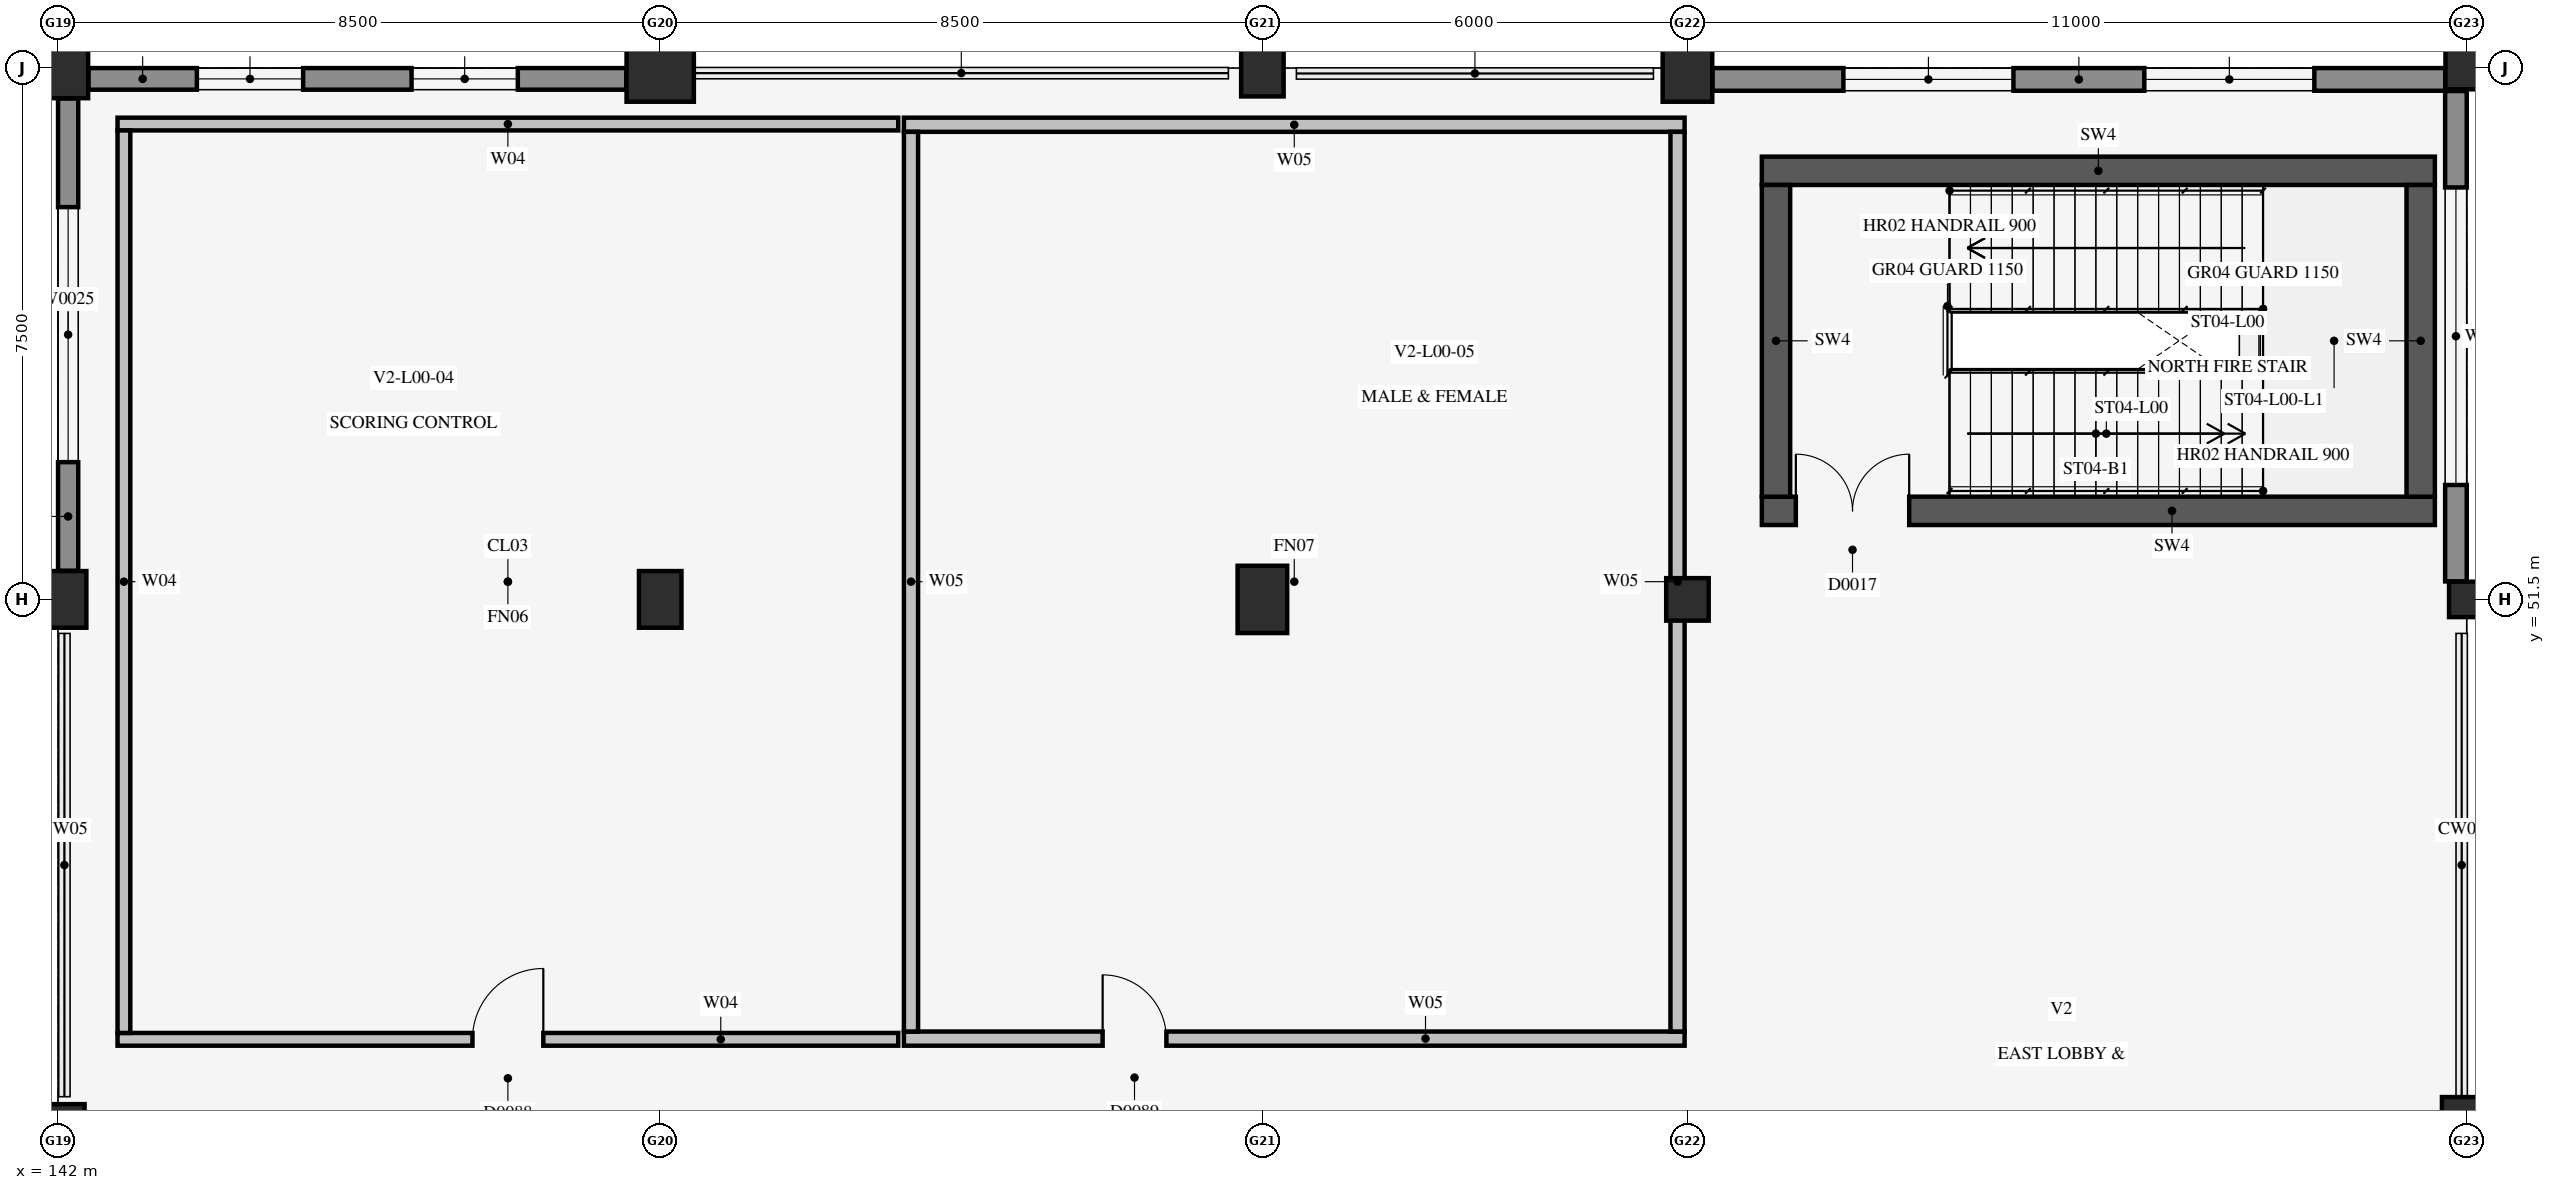
"""IFC4 building model, lengths in metres.
Left out: names, types, materials, properties, quantities, classifications, styles, units other than length and angle.
Written with IfcOpenShell. Run it as: python <this file> out.ifc"""

import sys

from ifc_helpers import new_model, si_unit, direction, frame, frame_2d, origin, origin_2d, place, context, subcontext, project, spatial, rectangle, circle, extrude, element, fill, save


model = new_model("IFC4")
c1 = context("Model", 3, precision=1e-05, world=origin(), true_north=direction((0.0, 1.0)))
c2 = subcontext(c1, "Body", "Model", "MODEL_VIEW")
j1 = project(units=[si_unit("LENGTHUNIT", "METRE"), si_unit("PLANEANGLEUNIT", "RADIAN")], contexts=[c1])
p1 = place(None, origin())
s1 = spatial("IfcSite", under=j1, at=p1, CompositionType="ELEMENT")
p2 = place(p1, origin())
s2 = spatial("IfcBuilding", under=s1, at=p2, CompositionType="ELEMENT")
p3 = place(p2, origin())
s3 = spatial("IfcBuildingStorey", under=s2, at=p3, CompositionType="ELEMENT", Elevation=0.0)
p4 = place(p3, frame((166.05, 52.75, 0.0), z_axis=(0.0, 0.0, 1.0), x_axis=(1.0, 0.0, 0.0)))
e1 = element("IfcWall", 1, at=p4, inside=s3, PredefinedType="SHEAR", context=c2, shape_type="SweptSolid", body=[
    extrude(rectangle(XDim=9.5, YDim=0.4, at=frame_2d((4.75, 0.0))), origin(), (0.0, 0.0, 1.0), 5.14),
])
p5 = place(p4, frame((0.48, 0.0, 0.0)))
e2 = element("IfcOpeningElement", 2, at=p5, cuts=e1, PredefinedType="OPENING", context=c2, shape_type="SweptSolid", body=[
    extrude(rectangle(XDim=1.6, YDim=2.2, at=frame_2d((0.8, 1.1))), frame((0.0, 0.212, 0.0), z_axis=(0.0, -1.0, 0.0), x_axis=(1.0, 0.0, 0.0)), (0.0, 0.0, 1.0), 0.424),
])
p6 = place(p3, frame((166.05, 57.55, 0.0), z_axis=(0.0, 0.0, 1.0), x_axis=(1.0, 0.0, 0.0)))
e3 = element("IfcWall", 3, at=p6, inside=s3, PredefinedType="SHEAR", context=c2, shape_type="SweptSolid", body=[
    extrude(rectangle(XDim=9.5, YDim=0.4, at=frame_2d((4.75, 0.0))), origin(), (0.0, 0.0, 1.0), 5.14),
])
for number, where, z_axis, x_axis in (
    (4, (166.25, 52.95, 0.0), (0.0, 0.0, 1.0), (0.0, 1.0, 0.0)),
    (5, (175.35, 52.95, 0.0), (0.0, 0.0, 1.0), (0.0, 1.0, 0.0)),
):
    element("IfcWall", number, at=place(p3, frame(where, z_axis=z_axis, x_axis=x_axis)), inside=s3, PredefinedType="SHEAR", context=c2, shape_type="SweptSolid", body=[
        extrude(rectangle(XDim=4.4, YDim=0.4, at=frame_2d((2.2, 0.0))), origin(), (0.0, 0.0, 1.0), 5.14),
    ])
p7 = place(p3, frame((142.0, 44.0, 0.0), z_axis=(0.0, 0.0, 1.0), x_axis=(1.0, 0.0, 0.0)))
e6 = element("IfcColumn", 6, at=p7, inside=s3, PredefinedType="COLUMN", context=c2, shape_type="SweptSolid", body=[
    extrude(rectangle(XDim=0.75, YDim=0.75, at=origin_2d()), origin(), (0.0, 0.0, 1.0), 5.4),
])
p8 = place(p3, frame((142.0, 51.5, 0.0), z_axis=(0.0, 0.0, 1.0), x_axis=(1.0, 0.0, 0.0)))
e7 = element("IfcColumn", 7, at=p8, inside=s3, PredefinedType="COLUMN", context=c2, shape_type="SweptSolid", body=[
    extrude(rectangle(XDim=0.8, YDim=0.8, at=origin_2d()), origin(), (0.0, 0.0, 1.0), 5.4),
])
p9 = place(p3, frame((142.0, 59.0, 0.0), z_axis=(0.0, 0.0, 1.0), x_axis=(1.0, 0.0, 0.0)))
e8 = element("IfcColumn", 8, at=p9, inside=s3, PredefinedType="COLUMN", context=c2, shape_type="SweptSolid", body=[
    extrude(rectangle(XDim=0.85, YDim=0.85, at=origin_2d()), origin(), (0.0, 0.0, 1.0), 5.4),
])
p10 = place(p3, frame((150.5, 51.5, 0.0), z_axis=(0.0, 0.0, 1.0), x_axis=(1.0, 0.0, 0.0)))
e9 = element("IfcColumn", 9, at=p10, inside=s3, PredefinedType="COLUMN", context=c2, shape_type="SweptSolid", body=[
    extrude(rectangle(XDim=0.6, YDim=0.8, at=origin_2d()), origin(), (0.0, 0.0, 1.0), 5.4),
])
p11 = place(p3, frame((150.5, 59.0, 0.0), z_axis=(0.0, 0.0, 1.0), x_axis=(1.0, 0.0, 0.0)))
e10 = element("IfcColumn", 10, at=p11, inside=s3, PredefinedType="COLUMN", context=c2, shape_type="SweptSolid", body=[
    extrude(rectangle(XDim=0.95, YDim=0.95, at=origin_2d()), origin(), (0.0, 0.0, 1.0), 5.4),
])
p12 = place(p3, frame((159.0, 51.5, 0.0), z_axis=(0.0, 0.0, 1.0), x_axis=(1.0, 0.0, 0.0)))
e11 = element("IfcColumn", 11, at=p12, inside=s3, PredefinedType="COLUMN", context=c2, shape_type="SweptSolid", body=[
    extrude(rectangle(XDim=0.7, YDim=0.95, at=origin_2d()), origin(), (0.0, 0.0, 1.0), 5.4),
])
p13 = place(p3, frame((159.0, 59.0, 0.0), z_axis=(0.0, 0.0, 1.0), x_axis=(1.0, 0.0, 0.0)))
e12 = element("IfcColumn", 12, at=p13, inside=s3, PredefinedType="COLUMN", context=c2, shape_type="SweptSolid", body=[
    extrude(rectangle(XDim=0.6, YDim=0.8, at=origin_2d()), origin(), (0.0, 0.0, 1.0), 5.4),
])
p14 = place(p3, frame((165.0, 51.5, 0.0), z_axis=(0.0, 0.0, 1.0), x_axis=(1.0, 0.0, 0.0)))
e13 = element("IfcColumn", 13, at=p14, inside=s3, PredefinedType="COLUMN", context=c2, shape_type="SweptSolid", body=[
    extrude(circle(Radius=0.3, at=origin_2d()), origin(), (0.0, 0.0, 1.0), 5.4),
])
for number, where, z_axis, x_axis in (
    (14, (165.0, 59.0, 0.0), (0.0, 0.0, 1.0), (1.0, 0.0, 0.0)),
    (15, (176.0, 44.0, 0.0), (0.0, 0.0, 1.0), (1.0, 0.0, 0.0)),
):
    element("IfcColumn", number, at=place(p3, frame(where, z_axis=z_axis, x_axis=x_axis)), inside=s3, PredefinedType="COLUMN", context=c2, shape_type="SweptSolid", body=[
        extrude(rectangle(XDim=0.7, YDim=0.95, at=origin_2d()), origin(), (0.0, 0.0, 1.0), 5.4),
    ])
p15 = place(p3, frame((176.0, 51.5, 0.0), z_axis=(0.0, 0.0, 1.0), x_axis=(1.0, 0.0, 0.0)))
e16 = element("IfcColumn", 16, at=p15, inside=s3, PredefinedType="COLUMN", context=c2, shape_type="SweptSolid", body=[
    extrude(circle(Radius=0.25, at=origin_2d()), origin(), (0.0, 0.0, 1.0), 5.4),
])
p16 = place(p3, frame((176.0, 59.0, 0.0), z_axis=(0.0, 0.0, 1.0), x_axis=(1.0, 0.0, 0.0)))
e17 = element("IfcColumn", 17, at=p16, inside=s3, PredefinedType="COLUMN", context=c2, shape_type="SweptSolid", body=[
    extrude(circle(Radius=0.3, at=origin_2d()), origin(), (0.0, 0.0, 1.0), 5.4),
])
p17 = place(p3, frame((142.84, 45.29, 0.0), z_axis=(0.0, 0.0, 1.0), x_axis=(1.0, 0.0, 0.0)))
e18 = element("IfcWall", 18, at=p17, inside=s3, PredefinedType="PARTITIONING", context=c2, shape_type="SweptSolid", body=[
    extrude(rectangle(XDim=11.02, YDim=0.18, at=frame_2d((5.51, 0.0))), origin(), (0.0, 0.0, 1.0), 5.125),
])
p18 = place(p17, frame((5.01, 0.0, 0.0)))
e19 = element("IfcOpeningElement", 19, at=p18, cuts=e18, PredefinedType="OPENING", context=c2, shape_type="SweptSolid", body=[
    extrude(rectangle(XDim=1.0, YDim=2.2, at=frame_2d((0.5, 1.1))), frame((0.0, 0.102, 0.0), z_axis=(0.0, -1.0, 0.0), x_axis=(1.0, 0.0, 0.0)), (0.0, 0.0, 1.0), 0.204),
])
p19 = place(p3, frame((142.84, 58.21, 0.0), z_axis=(0.0, 0.0, 1.0), x_axis=(1.0, 0.0, 0.0)))
e20 = element("IfcWall", 20, at=p19, inside=s3, PredefinedType="PARTITIONING", context=c2, shape_type="SweptSolid", body=[
    extrude(rectangle(XDim=11.02, YDim=0.18, at=frame_2d((5.51, 0.0))), origin(), (0.0, 0.0, 1.0), 5.125),
])
p20 = place(p3, frame((142.93, 45.38, 0.0), z_axis=(0.0, 0.0, 1.0), x_axis=(0.0, 1.0, 0.0)))
e21 = element("IfcWall", 21, at=p20, inside=s3, PredefinedType="PARTITIONING", context=c2, shape_type="SweptSolid", body=[
    extrude(rectangle(XDim=12.74, YDim=0.18, at=frame_2d((6.37, 0.0))), origin(), (0.0, 0.0, 1.0), 5.125),
])
p21 = place(p3, frame((153.94, 45.3, 0.0), z_axis=(0.0, 0.0, 1.0), x_axis=(1.0, 0.0, 0.0)))
e22 = element("IfcWall", 22, at=p21, inside=s3, PredefinedType="PLUMBINGWALL", context=c2, shape_type="SweptSolid", body=[
    extrude(rectangle(XDim=11.02, YDim=0.2, at=frame_2d((5.51, 0.0))), origin(), (0.0, 0.0, 1.0), 5.125),
])
p22 = place(p21, frame((2.805, 0.0, 0.0)))
e23 = element("IfcOpeningElement", 23, at=p22, cuts=e22, PredefinedType="OPENING", context=c2, shape_type="SweptSolid", body=[
    extrude(rectangle(XDim=0.9, YDim=2.1, at=frame_2d((0.45, 1.05))), frame((0.0, 0.112, 0.0), z_axis=(0.0, -1.0, 0.0), x_axis=(1.0, 0.0, 0.0)), (0.0, 0.0, 1.0), 0.224),
])
p23 = place(p3, frame((153.94, 58.2, 0.0), z_axis=(0.0, 0.0, 1.0), x_axis=(1.0, 0.0, 0.0)))
e24 = element("IfcWall", 24, at=p23, inside=s3, PredefinedType="PLUMBINGWALL", context=c2, shape_type="SweptSolid", body=[
    extrude(rectangle(XDim=11.02, YDim=0.2, at=frame_2d((5.51, 0.0))), origin(), (0.0, 0.0, 1.0), 5.125),
])
p24 = place(p3, frame((164.86, 45.4, 0.0), z_axis=(0.0, 0.0, 1.0), x_axis=(0.0, 1.0, 0.0)))
e25 = element("IfcWall", 25, at=p24, inside=s3, PredefinedType="PLUMBINGWALL", context=c2, shape_type="SweptSolid", body=[
    extrude(rectangle(XDim=12.7, YDim=0.2, at=frame_2d((6.35, 0.0))), origin(), (0.0, 0.0, 1.0), 4.643),
])
p25 = place(p3, frame((154.04, 45.4, 0.0), z_axis=(0.0, 0.0, 1.0), x_axis=(0.0, 1.0, 0.0)))
e26 = element("IfcWall", 26, at=p25, inside=s3, PredefinedType="PLUMBINGWALL", context=c2, shape_type="SweptSolid", body=[
    extrude(rectangle(XDim=12.7, YDim=0.2, at=frame_2d((6.35, 0.0))), origin(), (0.0, 0.0, 1.0), 5.125),
])
p26 = place(p3, frame((142.429, 58.847, 0.0), z_axis=(0.0, 0.0, 1.0), x_axis=(1.0, 0.0, 0.0)))
e27 = element("IfcWall", 27, at=p26, inside=s3, PredefinedType="SOLIDWALL", context=c2, shape_type="SweptSolid", body=[
    extrude(rectangle(XDim=7.592, YDim=0.305, at=frame_2d((3.796, 0.0))), origin(), (0.0, 0.0, 1.0), 4.697),
])
p27 = place(p26, frame((1.531, 0.0, 0.95)))
e28 = element("IfcOpeningElement", 28, at=p27, cuts=e27, PredefinedType="OPENING", context=c2, shape_type="SweptSolid", body=[
    extrude(rectangle(XDim=1.5, YDim=1.2, at=frame_2d((0.75, 0.6))), frame((0.0, 0.165, 0.0), z_axis=(0.0, -1.0, 0.0), x_axis=(1.0, 0.0, 0.0)), (0.0, 0.0, 1.0), 0.329),
])
p28 = place(p26, frame((4.561, 0.0, 0.95)))
e29 = element("IfcOpeningElement", 29, at=p28, cuts=e27, PredefinedType="OPENING", context=c2, shape_type="SweptSolid", body=[
    extrude(rectangle(XDim=1.5, YDim=1.2, at=frame_2d((0.75, 0.6))), frame((0.0, 0.165, 0.0), z_axis=(0.0, -1.0, 0.0), x_axis=(1.0, 0.0, 0.0)), (0.0, 0.0, 1.0), 0.329),
])
p29 = place(p3, frame((165.354, 58.84, 0.0), z_axis=(0.0, 0.0, 1.0), x_axis=(1.0, 0.0, 0.0)))
e30 = element("IfcWall", 30, at=p29, inside=s3, PredefinedType="SOLIDWALL", context=c2, shape_type="SweptSolid", body=[
    extrude(rectangle(XDim=10.342, YDim=0.32, at=frame_2d((5.171, 0.0))), origin(), (0.0, 0.0, 1.0), 4.498),
])
p30 = place(p29, frame((1.847, 0.0, 0.95)))
e31 = element("IfcOpeningElement", 31, at=p30, cuts=e30, PredefinedType="OPENING", context=c2, shape_type="SweptSolid", body=[
    extrude(rectangle(XDim=2.4, YDim=1.2, at=frame_2d((1.2, 0.6))), frame((0.0, 0.172, 0.0), z_axis=(0.0, -1.0, 0.0), x_axis=(1.0, 0.0, 0.0)), (0.0, 0.0, 1.0), 0.344),
])
p31 = place(p29, frame((6.095, 0.0, 0.95)))
e32 = element("IfcOpeningElement", 32, at=p31, cuts=e30, PredefinedType="OPENING", context=c2, shape_type="SweptSolid", body=[
    extrude(rectangle(XDim=2.4, YDim=1.2, at=frame_2d((1.2, 0.6))), frame((0.0, 0.172, 0.0), z_axis=(0.0, -1.0, 0.0), x_axis=(1.0, 0.0, 0.0)), (0.0, 0.0, 1.0), 0.344),
])
p32 = place(p3, frame((142.143, 51.904, 0.0), z_axis=(0.0, 0.0, 1.0), x_axis=(0.0, 1.0, 0.0)))
e33 = element("IfcWall", 33, at=p32, inside=s3, PredefinedType="SOLIDWALL", context=c2, shape_type="SweptSolid", body=[
    extrude(rectangle(XDim=6.667, YDim=0.285, at=frame_2d((3.333, 0.0))), origin(), (0.0, 0.0, 1.0), 4.697),
])
p33 = place(p32, frame((1.533, 0.0, 0.95)))
e34 = element("IfcOpeningElement", 34, at=p33, cuts=e33, PredefinedType="OPENING", context=c2, shape_type="SweptSolid", body=[
    extrude(rectangle(XDim=3.6, YDim=2.1, at=frame_2d((1.8, 1.05))), frame((0.0, 0.154, 0.0), z_axis=(0.0, -1.0, 0.0), x_axis=(1.0, 0.0, 0.0)), (0.0, 0.0, 1.0), 0.309),
])
p34 = place(p3, frame((175.847, 51.754, 0.0), z_axis=(0.0, 0.0, 1.0), x_axis=(0.0, 1.0, 0.0)))
e35 = element("IfcWall", 35, at=p34, inside=s3, PredefinedType="SOLIDWALL", context=c2, shape_type="SweptSolid", body=[
    extrude(rectangle(XDim=6.922, YDim=0.305, at=frame_2d((3.461, 0.0))), origin(), (0.0, 0.0, 1.0), 4.697),
])
p35 = place(p34, frame((1.361, 0.0, 0.95)))
e36 = element("IfcOpeningElement", 36, at=p35, cuts=e35, PredefinedType="OPENING", context=c2, shape_type="SweptSolid", body=[
    extrude(rectangle(XDim=4.2, YDim=2.1, at=frame_2d((2.1, 1.05))), frame((0.0, 0.165, 0.0), z_axis=(0.0, -1.0, 0.0), x_axis=(1.0, 0.0, 0.0)), (0.0, 0.0, 1.0), 0.329),
])
p36 = place(p5, frame((1.6, 0.0, 0.0), z_axis=(0.0, 0.0, 1.0), x_axis=(-1.0, 0.0, 0.0)))
e37 = element("IfcDoor", 37, at=p36, inside=s3, OperationType="DOUBLE_DOOR_SINGLE_SWING", PredefinedType="DOOR", context=c2, shape_type="SweptSolid", body=[
    extrude(rectangle(XDim=1.6, YDim=2.2, at=frame_2d((0.8, 1.1))), frame((0.0, 0.025, 0.0), z_axis=(0.0, -1.0, 0.0), x_axis=(1.0, 0.0, 0.0)), (0.0, 0.0, 1.0), 0.05),
])
fill(e2, e37)
p37 = place(p18, origin())
e38 = element("IfcDoor", 38, at=p37, inside=s3, OperationType="SINGLE_SWING_RIGHT", PredefinedType="DOOR", context=c2, shape_type="SweptSolid", body=[
    extrude(rectangle(XDim=1.0, YDim=2.2, at=frame_2d((0.5, 1.1))), frame((0.0, 0.025, 0.0), z_axis=(0.0, -1.0, 0.0), x_axis=(1.0, 0.0, 0.0)), (0.0, 0.0, 1.0), 0.05),
])
fill(e19, e38)
p38 = place(p22, origin())
e39 = element("IfcDoor", 39, at=p38, inside=s3, OperationType="SINGLE_SWING_LEFT", PredefinedType="DOOR", context=c2, shape_type="SweptSolid", body=[
    extrude(rectangle(XDim=0.9, YDim=2.1, at=frame_2d((0.45, 1.05))), frame((0.0, 0.025, 0.0), z_axis=(0.0, -1.0, 0.0), x_axis=(1.0, 0.0, 0.0)), (0.0, 0.0, 1.0), 0.05),
])
fill(e23, e39)
p39 = place(p27, origin())
e40 = element("IfcWindow", 40, at=p39, inside=s3, PartitioningType="SINGLE_PANEL", PredefinedType="WINDOW", context=c2, shape_type="SweptSolid", body=[
    extrude(rectangle(XDim=1.5, YDim=1.2, at=frame_2d((0.75, 0.6))), frame((0.0, 0.03, 0.0), z_axis=(0.0, -1.0, 0.0), x_axis=(1.0, 0.0, 0.0)), (0.0, 0.0, 1.0), 0.06),
])
fill(e28, e40)
p40 = place(p28, origin())
e41 = element("IfcWindow", 41, at=p40, inside=s3, PartitioningType="SINGLE_PANEL", PredefinedType="WINDOW", context=c2, shape_type="SweptSolid", body=[
    extrude(rectangle(XDim=1.5, YDim=1.2, at=frame_2d((0.75, 0.6))), frame((0.0, 0.03, 0.0), z_axis=(0.0, -1.0, 0.0), x_axis=(1.0, 0.0, 0.0)), (0.0, 0.0, 1.0), 0.06),
])
fill(e29, e41)
p41 = place(p30, origin())
e42 = element("IfcWindow", 42, at=p41, inside=s3, PartitioningType="SINGLE_PANEL", PredefinedType="WINDOW", context=c2, shape_type="SweptSolid", body=[
    extrude(rectangle(XDim=2.4, YDim=1.2, at=frame_2d((1.2, 0.6))), frame((0.0, 0.03, 0.0), z_axis=(0.0, -1.0, 0.0), x_axis=(1.0, 0.0, 0.0)), (0.0, 0.0, 1.0), 0.06),
])
fill(e31, e42)
p42 = place(p31, origin())
e43 = element("IfcWindow", 43, at=p42, inside=s3, PartitioningType="SINGLE_PANEL", PredefinedType="WINDOW", context=c2, shape_type="SweptSolid", body=[
    extrude(rectangle(XDim=2.4, YDim=1.2, at=frame_2d((1.2, 0.6))), frame((0.0, 0.03, 0.0), z_axis=(0.0, -1.0, 0.0), x_axis=(1.0, 0.0, 0.0)), (0.0, 0.0, 1.0), 0.06),
])
fill(e32, e43)
p43 = place(p33, origin())
e44 = element("IfcWindow", 44, at=p43, inside=s3, PartitioningType="SINGLE_PANEL", PredefinedType="WINDOW", context=c2, shape_type="SweptSolid", body=[
    extrude(rectangle(XDim=3.6, YDim=2.1, at=frame_2d((1.8, 1.05))), frame((0.0, 0.03, 0.0), z_axis=(0.0, -1.0, 0.0), x_axis=(1.0, 0.0, 0.0)), (0.0, 0.0, 1.0), 0.06),
])
fill(e34, e44)
p44 = place(p35, origin())
e45 = element("IfcWindow", 45, at=p44, inside=s3, PartitioningType="SINGLE_PANEL", PredefinedType="WINDOW", context=c2, shape_type="SweptSolid", body=[
    extrude(rectangle(XDim=4.2, YDim=2.1, at=frame_2d((2.1, 1.05))), frame((0.0, 0.03, 0.0), z_axis=(0.0, -1.0, 0.0), x_axis=(1.0, 0.0, 0.0)), (0.0, 0.0, 1.0), 0.06),
])
fill(e36, e45)
save(model, sys.argv[1])
